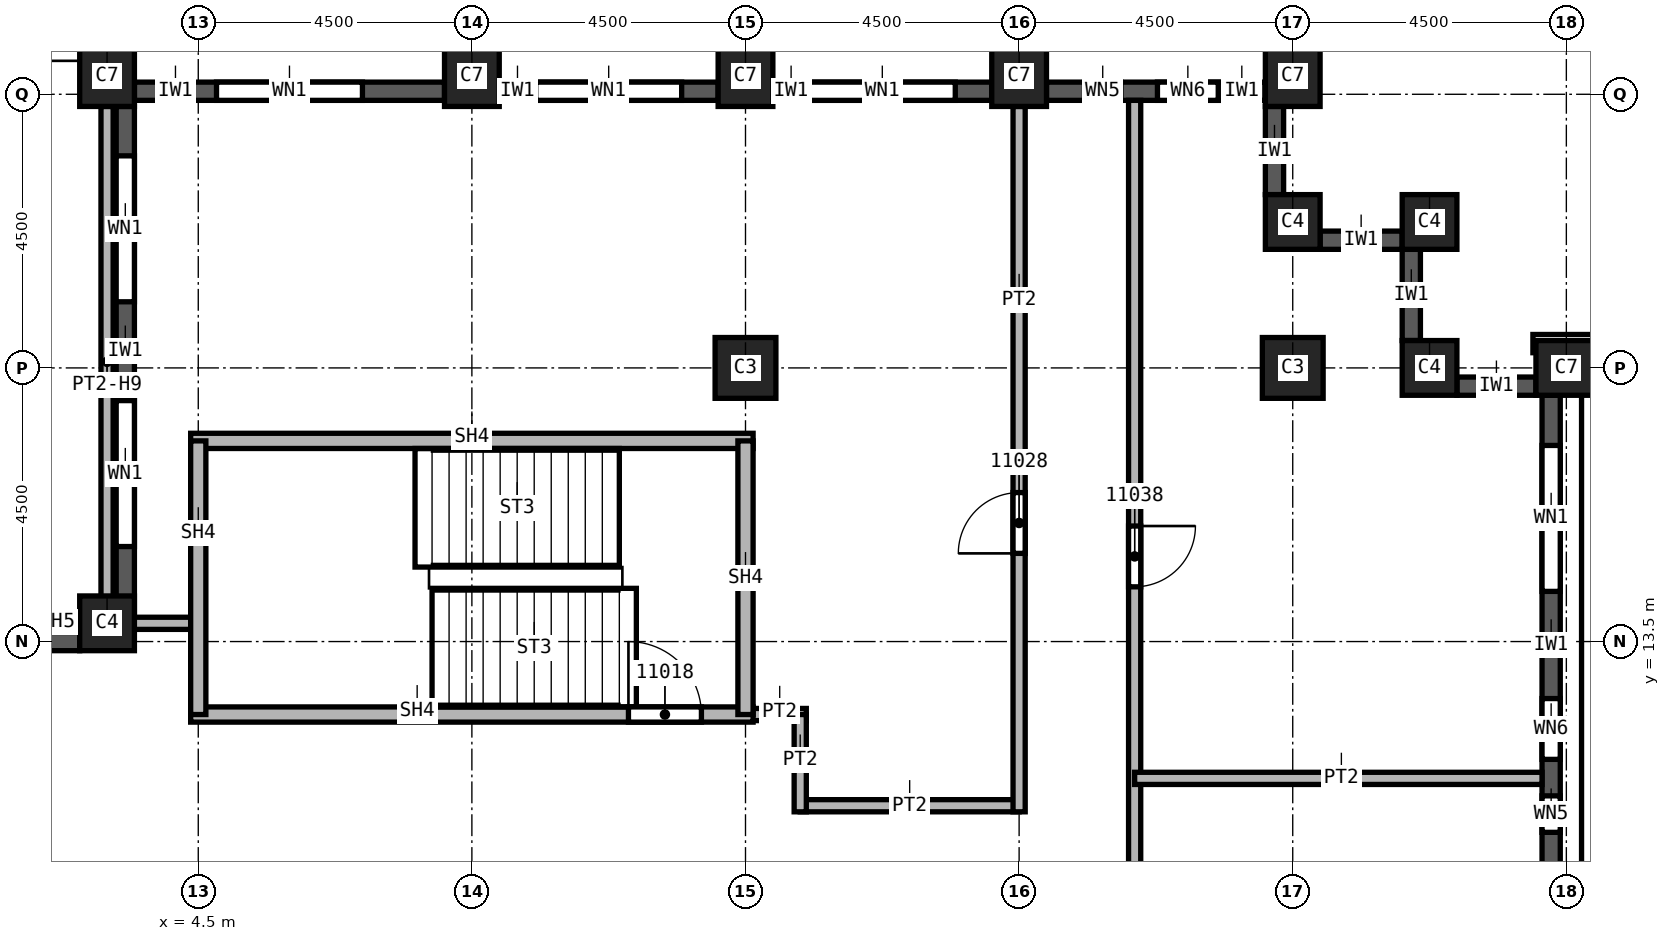
"""IFC4 building model, lengths in metres.
Left out: names, types, materials, properties, quantities, classifications, styles, units other than length and angle.
Written with IfcOpenShell. Run it as: python <this file> out.ifc"""

import sys

from ifc_helpers import new_model, si_unit, direction, frame, frame_2d, origin, origin_2d, place, context, subcontext, project, spatial, rectangle, extrude, element, fill, save


model = new_model("IFC4")
c1 = context("Model", 3, precision=1e-05, world=origin(), true_north=direction((0.0, 1.0)))
c2 = subcontext(c1, "Body", "Model", "MODEL_VIEW")
j1 = project(units=[si_unit("LENGTHUNIT", "METRE"), si_unit("PLANEANGLEUNIT", "RADIAN")], contexts=[c1])
p1 = place(None, origin())
s1 = spatial("IfcSite", under=j1, at=p1, CompositionType="ELEMENT")
p2 = place(p1, origin())
s2 = spatial("IfcBuilding", under=s1, at=p2, CompositionType="ELEMENT")
p3 = place(p2, frame((0.0, 0.0, 184.0)))
s3 = spatial("IfcBuildingStorey", under=s2, at=p3, CompositionType="ELEMENT", Elevation=184.0)
for number, where, z_axis, x_axis in (
    (1, (13.5, 18.0, 0.0), (0.0, 0.0, 1.0), (1.0, 0.0, 0.0)),
    (2, (22.5, 18.0, 0.0), (0.0, 0.0, 1.0), (1.0, 0.0, 0.0)),
):
    element("IfcColumn", number, at=place(p3, frame(where, z_axis=z_axis, x_axis=x_axis)), inside=s3, PredefinedType="COLUMN", context=c2, shape_type="SweptSolid", body=[
        extrude(rectangle(XDim=1.0, YDim=1.0, at=origin_2d()), origin(), (0.0, 0.0, 1.0), 3.72),
    ])
for number, where, z_axis, x_axis in (
    (3, (27.0, 18.0, 0.0), (0.0, 0.0, 1.0), (0.0, 1.0, 0.0)),
    (4, (3.0, 22.8, 0.0), (0.0, 0.0, 1.0), (1.0, 0.0, 0.0)),
    (5, (9.0, 22.8, 0.0), (0.0, 0.0, 1.0), (1.0, 0.0, 0.0)),
    (6, (13.5, 22.8, 0.0), (0.0, 0.0, 1.0), (1.0, 0.0, 0.0)),
    (7, (18.0, 22.8, 0.0), (0.0, 0.0, 1.0), (1.0, 0.0, 0.0)),
    (8, (22.5, 22.8, 0.0), (0.0, 0.0, 1.0), (1.0, 0.0, 0.0)),
):
    element("IfcColumn", number, at=place(p3, frame(where, z_axis=z_axis, x_axis=x_axis)), inside=s3, PredefinedType="COLUMN", context=c2, shape_type="SweptSolid", body=[
        extrude(rectangle(XDim=0.9, YDim=1.0, at=origin_2d()), origin(), (0.0, 0.0, 1.0), 3.72),
    ])
for number, where, z_axis, x_axis in (
    (9, (3.0, 13.8, 0.0), (0.0, 0.0, 1.0), (1.0, 0.0, 0.0)),
    (10, (22.5, 20.4, 0.0), (0.0, 0.0, 1.0), (1.0, 0.0, 0.0)),
    (11, (24.75, 20.4, 0.0), (0.0, 0.0, 1.0), (1.0, 0.0, 0.0)),
    (12, (24.75, 18.0, 0.0), (0.0, 0.0, 1.0), (1.0, 0.0, 0.0)),
):
    element("IfcColumn", number, at=place(p3, frame(where, z_axis=z_axis, x_axis=x_axis)), inside=s3, PredefinedType="COLUMN", context=c2, shape_type="SweptSolid", body=[
        extrude(rectangle(XDim=0.9, YDim=0.9, at=origin_2d()), origin(), (0.0, 0.0, 1.0), 3.72),
    ])
p4 = place(p3, frame((26.75, 9.45, 0.0), z_axis=(0.0, 0.0, 1.0), x_axis=(0.0, 1.0, 0.0)))
e13 = element("IfcWall", 13, at=p4, inside=s3, PredefinedType="SOLIDWALL", context=c2, shape_type="SweptSolid", body=[
    extrude(rectangle(XDim=8.1, YDim=0.3, at=frame_2d((4.05, 0.0))), origin(), (0.0, 0.0, 1.0), 3.12),
])
p5 = place(p4, frame((4.875, 0.0, 0.8)))
e14 = element("IfcOpeningElement", 14, at=p5, cuts=e13, PredefinedType="OPENING", context=c2, shape_type="SweptSolid", body=[
    extrude(rectangle(XDim=2.4, YDim=1.95, at=frame_2d((1.2, 0.975))), frame((0.0, 0.15, 0.0), z_axis=(0.0, -1.0, 0.0), x_axis=(1.0, 0.0, 0.0)), (0.0, 0.0, 1.0), 0.3),
])
p6 = place(p4, frame((0.913, 0.0, 0.8)))
e15 = element("IfcOpeningElement", 15, at=p6, cuts=e13, PredefinedType="OPENING", context=c2, shape_type="SweptSolid", body=[
    extrude(rectangle(XDim=0.6, YDim=1.95, at=frame_2d((0.3, 0.975))), frame((0.0, 0.15, 0.0), z_axis=(0.0, -1.0, 0.0), x_axis=(1.0, 0.0, 0.0)), (0.0, 0.0, 1.0), 0.3),
])
p7 = place(p4, frame((2.113, 0.0, 0.8)))
e16 = element("IfcOpeningElement", 16, at=p7, cuts=e13, PredefinedType="OPENING", context=c2, shape_type="SweptSolid", body=[
    extrude(rectangle(XDim=1.0, YDim=1.95, at=frame_2d((0.5, 0.975))), frame((0.0, 0.15, 0.0), z_axis=(0.0, -1.0, 0.0), x_axis=(1.0, 0.0, 0.0)), (0.0, 0.0, 1.0), 0.3),
])
p8 = place(p3, frame((26.5, 17.7, 0.0), z_axis=(0.0, 0.0, 1.0), x_axis=(-1.0, 0.0, 0.0)))
e17 = element("IfcWall", 17, at=p8, inside=s3, PredefinedType="SOLIDWALL", context=c2, shape_type="SweptSolid", body=[
    extrude(rectangle(XDim=1.3, YDim=0.3, at=frame_2d((0.65, 0.0))), origin(), (0.0, 0.0, 1.0), 3.12),
])
p9 = place(p3, frame((24.45, 18.45, 0.0), z_axis=(0.0, 0.0, 1.0), x_axis=(0.0, 1.0, 0.0)))
e18 = element("IfcWall", 18, at=p9, inside=s3, PredefinedType="SOLIDWALL", context=c2, shape_type="SweptSolid", body=[
    extrude(rectangle(XDim=1.5, YDim=0.3, at=frame_2d((0.75, 0.0))), origin(), (0.0, 0.0, 1.0), 3.12),
])
p10 = place(p3, frame((24.3, 20.1, 0.0), z_axis=(0.0, 0.0, 1.0), x_axis=(-1.0, 0.0, 0.0)))
e19 = element("IfcWall", 19, at=p10, inside=s3, PredefinedType="SOLIDWALL", context=c2, shape_type="SweptSolid", body=[
    extrude(rectangle(XDim=1.35, YDim=0.3, at=frame_2d((0.675, 0.0))), origin(), (0.0, 0.0, 1.0), 3.12),
])
p11 = place(p3, frame((22.2, 20.85, 0.0), z_axis=(0.0, 0.0, 1.0), x_axis=(0.0, 1.0, 0.0)))
e20 = element("IfcWall", 20, at=p11, inside=s3, PredefinedType="SOLIDWALL", context=c2, shape_type="SweptSolid", body=[
    extrude(rectangle(XDim=1.45, YDim=0.3, at=frame_2d((0.725, 0.0))), origin(), (0.0, 0.0, 1.0), 3.12),
])
p12 = place(p3, frame((22.05, 22.55, 0.0), z_axis=(0.0, 0.0, 1.0), x_axis=(-1.0, 0.0, 0.0)))
e21 = element("IfcWall", 21, at=p12, inside=s3, PredefinedType="SOLIDWALL", context=c2, shape_type="SweptSolid", body=[
    extrude(rectangle(XDim=3.6, YDim=0.3, at=frame_2d((1.8, 0.0))), origin(), (0.0, 0.0, 1.0), 3.12),
])
p13 = place(p12, frame((0.775, 0.0, 0.8)))
e22 = element("IfcOpeningElement", 22, at=p13, cuts=e21, PredefinedType="OPENING", context=c2, shape_type="SweptSolid", body=[
    extrude(rectangle(XDim=1.0, YDim=1.95, at=frame_2d((0.5, 0.975))), frame((0.0, 0.15, 0.0), z_axis=(0.0, -1.0, 0.0), x_axis=(1.0, 0.0, 0.0)), (0.0, 0.0, 1.0), 0.3),
])
p14 = place(p12, frame((2.375, 0.0, 0.8)))
e23 = element("IfcOpeningElement", 23, at=p14, cuts=e21, PredefinedType="OPENING", context=c2, shape_type="SweptSolid", body=[
    extrude(rectangle(XDim=0.6, YDim=1.95, at=frame_2d((0.3, 0.975))), frame((0.0, 0.15, 0.0), z_axis=(0.0, -1.0, 0.0), x_axis=(1.0, 0.0, 0.0)), (0.0, 0.0, 1.0), 0.3),
])
p15 = place(p3, frame((17.55, 22.55, 0.0), z_axis=(0.0, 0.0, 1.0), x_axis=(-1.0, 0.0, 0.0)))
e24 = element("IfcWall", 24, at=p15, inside=s3, PredefinedType="SOLIDWALL", context=c2, shape_type="SweptSolid", body=[
    extrude(rectangle(XDim=3.6, YDim=0.3, at=frame_2d((1.8, 0.0))), origin(), (0.0, 0.0, 1.0), 3.12),
])
p16 = place(p15, frame((0.6, 0.0, 0.8)))
e25 = element("IfcOpeningElement", 25, at=p16, cuts=e24, PredefinedType="OPENING", context=c2, shape_type="SweptSolid", body=[
    extrude(rectangle(XDim=2.4, YDim=1.95, at=frame_2d((1.2, 0.975))), frame((0.0, 0.15, 0.0), z_axis=(0.0, -1.0, 0.0), x_axis=(1.0, 0.0, 0.0)), (0.0, 0.0, 1.0), 0.3),
])
p17 = place(p3, frame((13.05, 22.55, 0.0), z_axis=(0.0, 0.0, 1.0), x_axis=(-1.0, 0.0, 0.0)))
e26 = element("IfcWall", 26, at=p17, inside=s3, PredefinedType="SOLIDWALL", context=c2, shape_type="SweptSolid", body=[
    extrude(rectangle(XDim=3.6, YDim=0.3, at=frame_2d((1.8, 0.0))), origin(), (0.0, 0.0, 1.0), 3.12),
])
p18 = place(p17, frame((0.6, 0.0, 0.8)))
e27 = element("IfcOpeningElement", 27, at=p18, cuts=e26, PredefinedType="OPENING", context=c2, shape_type="SweptSolid", body=[
    extrude(rectangle(XDim=2.4, YDim=1.95, at=frame_2d((1.2, 0.975))), frame((0.0, 0.15, 0.0), z_axis=(0.0, -1.0, 0.0), x_axis=(1.0, 0.0, 0.0)), (0.0, 0.0, 1.0), 0.3),
])
p19 = place(p3, frame((8.55, 22.55, 0.0), z_axis=(0.0, 0.0, 1.0), x_axis=(-1.0, 0.0, 0.0)))
e28 = element("IfcWall", 28, at=p19, inside=s3, PredefinedType="SOLIDWALL", context=c2, shape_type="SweptSolid", body=[
    extrude(rectangle(XDim=5.1, YDim=0.3, at=frame_2d((2.55, 0.0))), origin(), (0.0, 0.0, 1.0), 3.12),
])
p20 = place(p19, frame((1.35, 0.0, 0.8)))
e29 = element("IfcOpeningElement", 29, at=p20, cuts=e28, PredefinedType="OPENING", context=c2, shape_type="SweptSolid", body=[
    extrude(rectangle(XDim=2.4, YDim=1.95, at=frame_2d((1.2, 0.975))), frame((0.0, 0.15, 0.0), z_axis=(0.0, -1.0, 0.0), x_axis=(1.0, 0.0, 0.0)), (0.0, 0.0, 1.0), 0.3),
])
p21 = place(p3, frame((3.3, 22.3, 0.0), z_axis=(0.0, 0.0, 1.0), x_axis=(0.0, -1.0, 0.0)))
e30 = element("IfcWall", 30, at=p21, inside=s3, PredefinedType="SOLIDWALL", context=c2, shape_type="SweptSolid", body=[
    extrude(rectangle(XDim=8.45, YDim=0.3, at=frame_2d((4.225, 0.0))), origin(), (0.0, 0.0, 1.0), 3.12),
])
p22 = place(p21, frame((0.812, 0.0, 0.8)))
e31 = element("IfcOpeningElement", 31, at=p22, cuts=e30, PredefinedType="OPENING", context=c2, shape_type="SweptSolid", body=[
    extrude(rectangle(XDim=2.4, YDim=1.95, at=frame_2d((1.2, 0.975))), frame((0.0, 0.15, 0.0), z_axis=(0.0, -1.0, 0.0), x_axis=(1.0, 0.0, 0.0)), (0.0, 0.0, 1.0), 0.3),
])
p23 = place(p21, frame((4.837, 0.0, 0.8)))
e32 = element("IfcOpeningElement", 32, at=p23, cuts=e30, PredefinedType="OPENING", context=c2, shape_type="SweptSolid", body=[
    extrude(rectangle(XDim=2.4, YDim=1.95, at=frame_2d((1.2, 0.975))), frame((0.0, 0.15, 0.0), z_axis=(0.0, -1.0, 0.0), x_axis=(1.0, 0.0, 0.0)), (0.0, 0.0, 1.0), 0.3),
])
p24 = place(p3, frame((-2.55, 13.5, 0.0), z_axis=(0.0, 0.0, 1.0), x_axis=(1.0, 0.0, 0.0)))
e33 = element("IfcWall", 33, at=p24, inside=s3, PredefinedType="SOLIDWALL", context=c2, shape_type="SweptSolid", body=[
    extrude(rectangle(XDim=5.1, YDim=0.3, at=frame_2d((2.55, 0.0))), origin(), (0.0, 0.0, 1.0), 3.12),
])
p25 = place(p24, frame((1.95, 0.0, 0.0)))
e34 = element("IfcOpeningElement", 34, at=p25, cuts=e33, PredefinedType="OPENING", context=c2, shape_type="SweptSolid", body=[
    extrude(rectangle(XDim=1.2, YDim=2.4, at=frame_2d((0.6, 1.2))), frame((0.0, 0.15, 0.0), z_axis=(0.0, -1.0, 0.0), x_axis=(1.0, 0.0, 0.0)), (0.0, 0.0, 1.0), 0.3),
])
p26 = place(p3, frame((0.9, 13.8, 0.0), z_axis=(0.0, 0.0, 1.0), x_axis=(1.0, 0.0, 0.0)))
e35 = element("IfcWall", 35, at=p26, inside=s3, PredefinedType="PARTITIONING", context=c2, shape_type="SweptSolid", body=[
    extrude(rectangle(XDim=3.6, YDim=0.2, at=frame_2d((1.8, 0.0))), origin(), (0.0, 0.0, 1.0), 3.113),
])
p27 = place(p3, frame((3.0, 22.3, 0.0), z_axis=(0.0, 0.0, 1.0), x_axis=(0.0, -1.0, 0.0)))
e36 = element("IfcWall", 36, at=p27, inside=s3, PredefinedType="PARTITIONING", context=c2, shape_type="SweptSolid", body=[
    extrude(rectangle(XDim=8.5, YDim=0.2, at=frame_2d((4.25, 0.0))), origin(), (0.0, 0.0, 1.0), 2.874),
])
p28 = place(p3, frame((13.375, 12.3, 0.0), z_axis=(0.0, 0.0, 1.0), x_axis=(1.0, 0.0, 0.0)))
e37 = element("IfcWall", 37, at=p28, inside=s3, PredefinedType="PARTITIONING", context=c2, shape_type="SweptSolid", body=[
    extrude(rectangle(XDim=1.125, YDim=0.2, at=frame_2d((0.562, 0.0))), origin(), (0.0, 0.0, 1.0), 3.72),
])
p29 = place(p3, frame((14.4, 10.8, 0.0), z_axis=(0.0, 0.0, 1.0), x_axis=(1.0, 0.0, 0.0)))
e38 = element("IfcWall", 38, at=p29, inside=s3, PredefinedType="PARTITIONING", context=c2, shape_type="SweptSolid", body=[
    extrude(rectangle(XDim=3.6, YDim=0.2, at=frame_2d((1.8, 0.0))), origin(), (0.0, 0.0, 1.0), 3.72),
])
p30 = place(p3, frame((14.4, 12.3, 0.0), z_axis=(0.0, 0.0, 1.0), x_axis=(0.0, -1.0, 0.0)))
e39 = element("IfcWall", 39, at=p30, inside=s3, PredefinedType="PARTITIONING", context=c2, shape_type="SweptSolid", body=[
    extrude(rectangle(XDim=1.6, YDim=0.2, at=frame_2d((0.8, 0.0))), origin(), (0.0, 0.0, 1.0), 3.72),
])
p31 = place(p3, frame((18.0, 10.7, 0.0), z_axis=(0.0, 0.0, 1.0), x_axis=(0.0, 1.0, 0.0)))
e40 = element("IfcWall", 40, at=p31, inside=s3, PredefinedType="PARTITIONING", context=c2, shape_type="SweptSolid", body=[
    extrude(rectangle(XDim=11.6, YDim=0.2, at=frame_2d((5.8, 0.0))), origin(), (0.0, 0.0, 1.0), 3.72),
])
p32 = place(p31, frame((4.25, 0.0, 0.0)))
e41 = element("IfcOpeningElement", 41, at=p32, cuts=e40, PredefinedType="OPENING", context=c2, shape_type="SweptSolid", body=[
    extrude(rectangle(XDim=1.0, YDim=2.1, at=frame_2d((0.5, 1.05))), frame((0.0, 0.1, 0.0), z_axis=(0.0, -1.0, 0.0), x_axis=(1.0, 0.0, 0.0)), (0.0, 0.0, 1.0), 0.2),
])
p33 = place(p3, frame((19.9, 22.4, 0.0), z_axis=(0.0, 0.0, 1.0), x_axis=(0.0, -1.0, 0.0)))
e42 = element("IfcWall", 42, at=p33, inside=s3, PredefinedType="PARTITIONING", context=c2, shape_type="SweptSolid", body=[
    extrude(rectangle(XDim=31.1, YDim=0.2, at=frame_2d((15.55, 0.0))), origin(), (0.0, 0.0, 1.0), 3.72),
])
p34 = place(p33, frame((15.8, 0.0, 0.0)))
e43 = element("IfcOpeningElement", 43, at=p34, cuts=e42, PredefinedType="OPENING", context=c2, shape_type="SweptSolid", body=[
    extrude(rectangle(XDim=1.0, YDim=2.1, at=frame_2d((0.5, 1.05))), frame((0.0, 0.1, 0.0), z_axis=(0.0, -1.0, 0.0), x_axis=(1.0, 0.0, 0.0)), (0.0, 0.0, 1.0), 0.2),
])
p35 = place(p33, frame((14.45, 0.0, 0.0)))
e44 = element("IfcOpeningElement", 44, at=p35, cuts=e42, PredefinedType="OPENING", context=c2, shape_type="SweptSolid", body=[
    extrude(rectangle(XDim=1.0, YDim=2.1, at=frame_2d((0.5, 1.05))), frame((0.0, 0.1, 0.0), z_axis=(0.0, -1.0, 0.0), x_axis=(1.0, 0.0, 0.0)), (0.0, 0.0, 1.0), 0.2),
])
p36 = place(p33, frame((7.0, 0.0, 0.0)))
e45 = element("IfcOpeningElement", 45, at=p36, cuts=e42, PredefinedType="OPENING", context=c2, shape_type="SweptSolid", body=[
    extrude(rectangle(XDim=1.0, YDim=2.1, at=frame_2d((0.5, 1.05))), frame((0.0, 0.1, 0.0), z_axis=(0.0, -1.0, 0.0), x_axis=(1.0, 0.0, 0.0)), (0.0, 0.0, 1.0), 0.2),
])
p37 = place(p33, frame((27.05, 0.0, 0.0)))
e46 = element("IfcOpeningElement", 46, at=p37, cuts=e42, PredefinedType="OPENING", context=c2, shape_type="SweptSolid", body=[
    extrude(rectangle(XDim=1.0, YDim=2.1, at=frame_2d((0.5, 1.05))), frame((0.0, 0.1, 0.0), z_axis=(0.0, -1.0, 0.0), x_axis=(1.0, 0.0, 0.0)), (0.0, 0.0, 1.0), 0.2),
])
p38 = place(p3, frame((19.9, 11.25, 0.0), z_axis=(0.0, 0.0, 1.0), x_axis=(1.0, 0.0, 0.0)))
e47 = element("IfcWall", 47, at=p38, inside=s3, PredefinedType="PARTITIONING", context=c2, shape_type="SweptSolid", body=[
    extrude(rectangle(XDim=6.7, YDim=0.2, at=frame_2d((3.35, 0.0))), origin(), (0.0, 0.0, 1.0), 3.72),
])
p39 = place(p3, frame((4.375, 12.3, 0.0), z_axis=(0.0, 0.0, 1.0), x_axis=(1.0, 0.0, 0.0)))
e48 = element("IfcWall", 48, at=p39, inside=s3, PredefinedType="SOLIDWALL", context=c2, shape_type="SweptSolid", body=[
    extrude(rectangle(XDim=9.25, YDim=0.25, at=frame_2d((4.625, 0.0))), origin(), (0.0, 0.0, 1.0), 3.72),
])
p40 = place(p39, frame((7.2, 0.0, 0.0)))
e49 = element("IfcOpeningElement", 49, at=p40, cuts=e48, PredefinedType="OPENING", context=c2, shape_type="SweptSolid", body=[
    extrude(rectangle(XDim=1.2, YDim=2.1, at=frame_2d((0.6, 1.05))), frame((0.0, 0.125, 0.0), z_axis=(0.0, -1.0, 0.0), x_axis=(1.0, 0.0, 0.0)), (0.0, 0.0, 1.0), 0.25),
])
p41 = place(p3, frame((4.375, 16.8, 0.0), z_axis=(0.0, 0.0, 1.0), x_axis=(1.0, 0.0, 0.0)))
e50 = element("IfcWall", 50, at=p41, inside=s3, PredefinedType="SOLIDWALL", context=c2, shape_type="SweptSolid", body=[
    extrude(rectangle(XDim=9.25, YDim=0.25, at=frame_2d((4.625, 0.0))), origin(), (0.0, 0.0, 1.0), 3.72),
])
for number, where, z_axis, x_axis in (
    (51, (4.5, 12.3, 0.0), (0.0, 0.0, 1.0), (0.0, 1.0, 0.0)),
    (52, (13.5, 16.8, 0.0), (0.0, 0.0, 1.0), (0.0, -1.0, 0.0)),
):
    element("IfcWall", number, at=place(p3, frame(where, z_axis=z_axis, x_axis=x_axis)), inside=s3, PredefinedType="SOLIDWALL", context=c2, shape_type="SweptSolid", body=[
        extrude(rectangle(XDim=4.5, YDim=0.25, at=frame_2d((2.25, 0.0))), origin(), (0.0, 0.0, 1.0), 3.72),
    ])
p42 = place(p5, origin())
e53 = element("IfcWindow", 53, at=p42, inside=s3, PartitioningType="SINGLE_PANEL", PredefinedType="WINDOW", context=c2, shape_type="SweptSolid", body=[
    extrude(rectangle(XDim=2.4, YDim=1.95, at=frame_2d((1.2, 0.975))), frame((0.0, 0.03, 0.0), z_axis=(0.0, -1.0, 0.0), x_axis=(1.0, 0.0, 0.0)), (0.0, 0.0, 1.0), 0.06),
])
fill(e14, e53)
p43 = place(p16, origin())
e54 = element("IfcWindow", 54, at=p43, inside=s3, PartitioningType="SINGLE_PANEL", PredefinedType="WINDOW", context=c2, shape_type="SweptSolid", body=[
    extrude(rectangle(XDim=2.4, YDim=1.95, at=frame_2d((1.2, 0.975))), frame((0.0, 0.03, 0.0), z_axis=(0.0, -1.0, 0.0), x_axis=(1.0, 0.0, 0.0)), (0.0, 0.0, 1.0), 0.06),
])
fill(e25, e54)
p44 = place(p18, origin())
e55 = element("IfcWindow", 55, at=p44, inside=s3, PartitioningType="SINGLE_PANEL", PredefinedType="WINDOW", context=c2, shape_type="SweptSolid", body=[
    extrude(rectangle(XDim=2.4, YDim=1.95, at=frame_2d((1.2, 0.975))), frame((0.0, 0.03, 0.0), z_axis=(0.0, -1.0, 0.0), x_axis=(1.0, 0.0, 0.0)), (0.0, 0.0, 1.0), 0.06),
])
fill(e27, e55)
p45 = place(p20, origin())
e56 = element("IfcWindow", 56, at=p45, inside=s3, PartitioningType="SINGLE_PANEL", PredefinedType="WINDOW", context=c2, shape_type="SweptSolid", body=[
    extrude(rectangle(XDim=2.4, YDim=1.95, at=frame_2d((1.2, 0.975))), frame((0.0, 0.03, 0.0), z_axis=(0.0, -1.0, 0.0), x_axis=(1.0, 0.0, 0.0)), (0.0, 0.0, 1.0), 0.06),
])
fill(e29, e56)
p46 = place(p22, origin())
e57 = element("IfcWindow", 57, at=p46, inside=s3, PartitioningType="SINGLE_PANEL", PredefinedType="WINDOW", context=c2, shape_type="SweptSolid", body=[
    extrude(rectangle(XDim=2.4, YDim=1.95, at=frame_2d((1.2, 0.975))), frame((0.0, 0.03, 0.0), z_axis=(0.0, -1.0, 0.0), x_axis=(1.0, 0.0, 0.0)), (0.0, 0.0, 1.0), 0.06),
])
fill(e31, e57)
p47 = place(p23, origin())
e58 = element("IfcWindow", 58, at=p47, inside=s3, PartitioningType="SINGLE_PANEL", PredefinedType="WINDOW", context=c2, shape_type="SweptSolid", body=[
    extrude(rectangle(XDim=2.4, YDim=1.95, at=frame_2d((1.2, 0.975))), frame((0.0, 0.03, 0.0), z_axis=(0.0, -1.0, 0.0), x_axis=(1.0, 0.0, 0.0)), (0.0, 0.0, 1.0), 0.06),
])
fill(e32, e58)
p48 = place(p40, origin())
e59 = element("IfcDoor", 59, at=p48, inside=s3, OperationType="SINGLE_SWING_LEFT", PredefinedType="DOOR", context=c2, shape_type="SweptSolid", body=[
    extrude(rectangle(XDim=1.2, YDim=2.1, at=frame_2d((0.6, 1.05))), frame((0.0, 0.025, 0.0), z_axis=(0.0, -1.0, 0.0), x_axis=(1.0, 0.0, 0.0)), (0.0, 0.0, 1.0), 0.05),
])
fill(e49, e59)
p49 = place(p32, origin())
e60 = element("IfcDoor", 60, at=p49, inside=s3, OperationType="SINGLE_SWING_LEFT", PredefinedType="DOOR", context=c2, shape_type="SweptSolid", body=[
    extrude(rectangle(XDim=1.0, YDim=2.1, at=frame_2d((0.5, 1.05))), frame((0.0, 0.025, 0.0), z_axis=(0.0, -1.0, 0.0), x_axis=(1.0, 0.0, 0.0)), (0.0, 0.0, 1.0), 0.05),
])
fill(e41, e60)
p50 = place(p36, origin())
e61 = element("IfcDoor", 61, at=p50, inside=s3, OperationType="SINGLE_SWING_LEFT", PredefinedType="DOOR", context=c2, shape_type="SweptSolid", body=[
    extrude(rectangle(XDim=1.0, YDim=2.1, at=frame_2d((0.5, 1.05))), frame((0.0, 0.025, 0.0), z_axis=(0.0, -1.0, 0.0), x_axis=(1.0, 0.0, 0.0)), (0.0, 0.0, 1.0), 0.05),
])
fill(e45, e61)
p51 = place(p6, origin())
e62 = element("IfcWindow", 62, at=p51, inside=s3, PartitioningType="SINGLE_PANEL", PredefinedType="WINDOW", context=c2, shape_type="SweptSolid", body=[
    extrude(rectangle(XDim=0.6, YDim=1.95, at=frame_2d((0.3, 0.975))), frame((0.0, 0.03, 0.0), z_axis=(0.0, -1.0, 0.0), x_axis=(1.0, 0.0, 0.0)), (0.0, 0.0, 1.0), 0.06),
])
fill(e15, e62)
p52 = place(p7, origin())
e63 = element("IfcWindow", 63, at=p52, inside=s3, PartitioningType="SINGLE_PANEL", PredefinedType="WINDOW", context=c2, shape_type="SweptSolid", body=[
    extrude(rectangle(XDim=1.0, YDim=1.95, at=frame_2d((0.5, 0.975))), frame((0.0, 0.03, 0.0), z_axis=(0.0, -1.0, 0.0), x_axis=(1.0, 0.0, 0.0)), (0.0, 0.0, 1.0), 0.06),
])
fill(e16, e63)
p53 = place(p13, origin())
e64 = element("IfcWindow", 64, at=p53, inside=s3, PartitioningType="SINGLE_PANEL", PredefinedType="WINDOW", context=c2, shape_type="SweptSolid", body=[
    extrude(rectangle(XDim=1.0, YDim=1.95, at=frame_2d((0.5, 0.975))), frame((0.0, 0.03, 0.0), z_axis=(0.0, -1.0, 0.0), x_axis=(1.0, 0.0, 0.0)), (0.0, 0.0, 1.0), 0.06),
])
fill(e22, e64)
p54 = place(p14, origin())
e65 = element("IfcWindow", 65, at=p54, inside=s3, PartitioningType="SINGLE_PANEL", PredefinedType="WINDOW", context=c2, shape_type="SweptSolid", body=[
    extrude(rectangle(XDim=0.6, YDim=1.95, at=frame_2d((0.3, 0.975))), frame((0.0, 0.03, 0.0), z_axis=(0.0, -1.0, 0.0), x_axis=(1.0, 0.0, 0.0)), (0.0, 0.0, 1.0), 0.06),
])
fill(e23, e65)
save(model, sys.argv[1])
